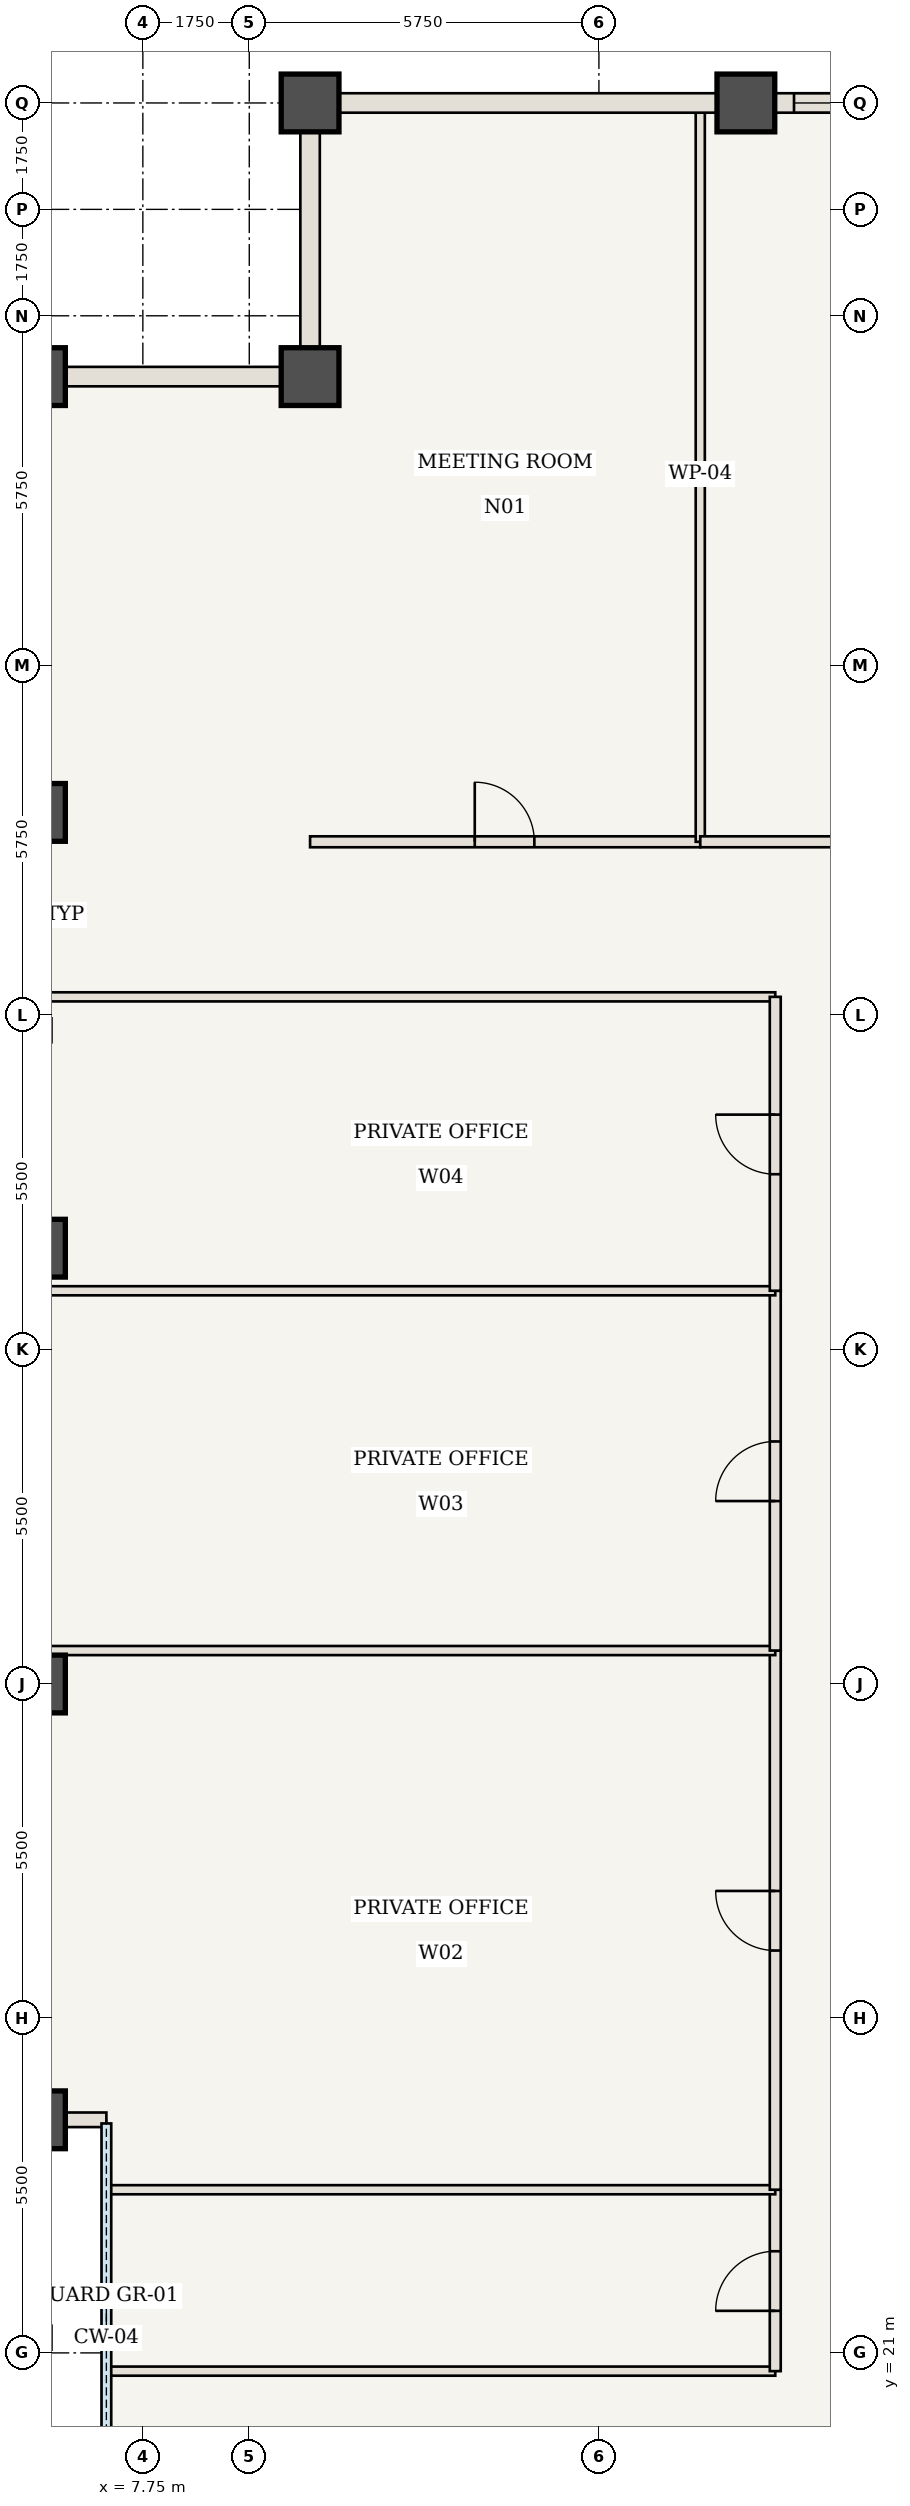
"""IFC4 building model, lengths in metres.
Left out: names, types, materials, properties, quantities, classifications, styles, units other than length and angle.
Written with IfcOpenShell. Run it as: python <this file> out.ifc"""

import sys

from ifc_helpers import new_model, si_unit, direction, frame, frame_2d, origin, origin_2d, place, context, subcontext, project, spatial, rectangle, extrude, element, fill, save


model = new_model("IFC4")
c1 = context("Model", 3, precision=1e-05, world=origin(), true_north=direction((0.0, 1.0)))
c2 = subcontext(c1, "Body", "Model", "MODEL_VIEW")
j1 = project(units=[si_unit("LENGTHUNIT", "METRE"), si_unit("PLANEANGLEUNIT", "RADIAN")], contexts=[c1])
p1 = place(None, origin())
s1 = spatial("IfcSite", under=j1, at=p1, CompositionType="ELEMENT")
p2 = place(p1, origin())
s2 = spatial("IfcBuilding", under=s1, at=p2, CompositionType="ELEMENT")
p3 = place(p2, frame((0.0, 0.0, 172.2)))
s3 = spatial("IfcBuildingStorey", under=s2, at=p3, CompositionType="ELEMENT", Elevation=172.2)
for number, where, z_axis, x_axis in (
    (1, (10.5, 58.0, 0.0), (0.0, 0.0, 1.0), (1.0, 0.0, 0.0)),
    (2, (10.5, 53.5, 0.0), (0.0, 0.0, 1.0), (1.0, 0.0, 0.0)),
    (3, (6.0, 53.5, 0.0), (0.0, 0.0, 1.0), (1.0, 0.0, 0.0)),
    (4, (17.667, 58.0, 0.0), (0.0, 0.0, 1.0), (1.0, 0.0, 0.0)),
    (5, (6.0, 24.833, 0.0), (0.0, 0.0, 1.0), (1.0, 0.0, 0.0)),
    (6, (6.0, 32.0, 0.0), (0.0, 0.0, 1.0), (1.0, 0.0, 0.0)),
    (7, (6.0, 39.167, 0.0), (0.0, 0.0, 1.0), (1.0, 0.0, 0.0)),
    (8, (6.0, 46.333, 0.0), (0.0, 0.0, 1.0), (1.0, 0.0, 0.0)),
):
    element("IfcColumn", number, at=place(p3, frame(where, z_axis=z_axis, x_axis=x_axis)), inside=s3, PredefinedType="COLUMN", context=c2, shape_type="SweptSolid", body=[
        extrude(rectangle(XDim=0.95, YDim=0.95, at=origin_2d()), origin(), (0.0, 0.0, 1.0), 3.85),
    ])
p4 = place(p3, frame((10.5, 45.85, 0.0), z_axis=(0.0, 0.0, 1.0), x_axis=(1.0, 0.0, 0.0)))
e9 = element("IfcWall", 9, at=p4, inside=s3, PredefinedType="STANDARD", context=c2, shape_type="SweptSolid", body=[
    extrude(rectangle(XDim=6.417, YDim=0.18, at=frame_2d((3.208, 0.0))), origin(), (0.0, 0.0, 1.0), 3.43),
])
p5 = place(p4, frame((2.708, 0.0, 0.0)))
e10 = element("IfcOpeningElement", 10, at=p5, cuts=e9, PredefinedType="OPENING", context=c2, shape_type="SweptSolid", body=[
    extrude(rectangle(XDim=0.98, YDim=2.2, at=frame_2d((0.49, 1.1))), frame((0.0, 0.1, 0.0), z_axis=(0.0, -1.0, 0.0), x_axis=(1.0, 0.0, 0.0)), (0.0, 0.0, 1.0), 0.2),
])
p6 = place(p3, frame((16.917, 45.85, 0.0), z_axis=(0.0, 0.0, 1.0), x_axis=(0.0, 1.0, 0.0)))
e11 = element("IfcWall", 11, at=p6, inside=s3, PredefinedType="STANDARD", context=c2, shape_type="SweptSolid", body=[
    extrude(rectangle(XDim=12.09, YDim=0.15, at=frame_2d((6.045, 0.0))), origin(), (0.0, 0.0, 1.0), 3.43),
])
p7 = place(p3, frame((16.917, 45.85, 0.0), z_axis=(0.0, 0.0, 1.0), x_axis=(1.0, 0.0, 0.0)))
e12 = element("IfcWall", 12, at=p7, inside=s3, PredefinedType="STANDARD", context=c2, shape_type="SweptSolid", body=[
    extrude(rectangle(XDim=8.866, YDim=0.18, at=frame_2d((4.433, 0.0))), origin(), (0.0, 0.0, 1.0), 3.43),
])
p8 = place(p7, frame((5.383, 0.0, 0.0)))
e13 = element("IfcOpeningElement", 13, at=p8, cuts=e12, PredefinedType="OPENING", context=c2, shape_type="SweptSolid", body=[
    extrude(rectangle(XDim=0.98, YDim=2.2, at=frame_2d((0.49, 1.1))), frame((0.0, 0.1, 0.0), z_axis=(0.0, -1.0, 0.0), x_axis=(1.0, 0.0, 0.0)), (0.0, 0.0, 1.0), 0.2),
])
p9 = place(p3, frame((7.16, 20.7, 0.0), z_axis=(0.0, 0.0, 1.0), x_axis=(1.0, 0.0, 0.0)))
e14 = element("IfcWall", 14, at=p9, inside=s3, PredefinedType="STANDARD", context=c2, shape_type="SweptSolid", body=[
    extrude(rectangle(XDim=10.99, YDim=0.15, at=frame_2d((5.495, 0.0))), origin(), (0.0, 0.0, 1.0), 2.81),
])
p10 = place(p3, frame((6.06, 43.3, 0.0), z_axis=(0.0, 0.0, 1.0), x_axis=(1.0, 0.0, 0.0)))
e15 = element("IfcWall", 15, at=p10, inside=s3, PredefinedType="STANDARD", context=c2, shape_type="SweptSolid", body=[
    extrude(rectangle(XDim=12.09, YDim=0.15, at=frame_2d((6.045, 0.0))), origin(), (0.0, 0.0, 1.0), 2.81),
])
p11 = place(p3, frame((18.15, 20.7, 0.0), z_axis=(0.0, 0.0, 1.0), x_axis=(0.0, 1.0, 0.0)))
e16 = element("IfcWall", 16, at=p11, inside=s3, PredefinedType="STANDARD", context=c2, shape_type="SweptSolid", body=[
    extrude(rectangle(XDim=2.983, YDim=0.18, at=frame_2d((1.492, 0.0))), origin(), (0.0, 0.0, 1.0), 3.43),
])
p12 = place(p11, frame((0.992, 0.0, 0.0)))
e17 = element("IfcOpeningElement", 17, at=p12, cuts=e16, PredefinedType="OPENING", context=c2, shape_type="SweptSolid", body=[
    extrude(rectangle(XDim=0.98, YDim=2.2, at=frame_2d((0.49, 1.1))), frame((0.0, 0.1, 0.0), z_axis=(0.0, -1.0, 0.0), x_axis=(1.0, 0.0, 0.0)), (0.0, 0.0, 1.0), 0.2),
])
p13 = place(p3, frame((7.16, 23.683, 0.0), z_axis=(0.0, 0.0, 1.0), x_axis=(1.0, 0.0, 0.0)))
e18 = element("IfcWall", 18, at=p13, inside=s3, PredefinedType="STANDARD", context=c2, shape_type="SweptSolid", body=[
    extrude(rectangle(XDim=10.99, YDim=0.15, at=frame_2d((5.495, 0.0))), origin(), (0.0, 0.0, 1.0), 3.43),
])
p14 = place(p3, frame((18.15, 23.683, 0.0), z_axis=(0.0, 0.0, 1.0), x_axis=(0.0, 1.0, 0.0)))
e19 = element("IfcWall", 19, at=p14, inside=s3, PredefinedType="STANDARD", context=c2, shape_type="SweptSolid", body=[
    extrude(rectangle(XDim=8.867, YDim=0.18, at=frame_2d((4.433, 0.0))), origin(), (0.0, 0.0, 1.0), 3.43),
])
p15 = place(p14, frame((3.933, 0.0, 0.0)))
e20 = element("IfcOpeningElement", 20, at=p15, cuts=e19, PredefinedType="OPENING", context=c2, shape_type="SweptSolid", body=[
    extrude(rectangle(XDim=0.98, YDim=2.2, at=frame_2d((0.49, 1.1))), frame((0.0, 0.1, 0.0), z_axis=(0.0, -1.0, 0.0), x_axis=(1.0, 0.0, 0.0)), (0.0, 0.0, 1.0), 0.2),
])
p16 = place(p3, frame((6.06, 32.55, 0.0), z_axis=(0.0, 0.0, 1.0), x_axis=(1.0, 0.0, 0.0)))
e21 = element("IfcWall", 21, at=p16, inside=s3, PredefinedType="STANDARD", context=c2, shape_type="SweptSolid", body=[
    extrude(rectangle(XDim=12.09, YDim=0.15, at=frame_2d((6.045, 0.0))), origin(), (0.0, 0.0, 1.0), 3.43),
])
p17 = place(p3, frame((18.15, 32.55, 0.0), z_axis=(0.0, 0.0, 1.0), x_axis=(0.0, 1.0, 0.0)))
e22 = element("IfcWall", 22, at=p17, inside=s3, PredefinedType="STANDARD", context=c2, shape_type="SweptSolid", body=[
    extrude(rectangle(XDim=5.917, YDim=0.18, at=frame_2d((2.958, 0.0))), origin(), (0.0, 0.0, 1.0), 3.43),
])
p18 = place(p17, frame((2.458, 0.0, 0.0)))
e23 = element("IfcOpeningElement", 23, at=p18, cuts=e22, PredefinedType="OPENING", context=c2, shape_type="SweptSolid", body=[
    extrude(rectangle(XDim=0.98, YDim=2.2, at=frame_2d((0.49, 1.1))), frame((0.0, 0.1, 0.0), z_axis=(0.0, -1.0, 0.0), x_axis=(1.0, 0.0, 0.0)), (0.0, 0.0, 1.0), 0.2),
])
p19 = place(p3, frame((6.06, 38.467, 0.0), z_axis=(0.0, 0.0, 1.0), x_axis=(1.0, 0.0, 0.0)))
e24 = element("IfcWall", 24, at=p19, inside=s3, PredefinedType="STANDARD", context=c2, shape_type="SweptSolid", body=[
    extrude(rectangle(XDim=12.09, YDim=0.15, at=frame_2d((6.045, 0.0))), origin(), (0.0, 0.0, 1.0), 3.43),
])
p20 = place(p3, frame((18.15, 38.467, 0.0), z_axis=(0.0, 0.0, 1.0), x_axis=(0.0, 1.0, 0.0)))
e25 = element("IfcWall", 25, at=p20, inside=s3, PredefinedType="STANDARD", context=c2, shape_type="SweptSolid", body=[
    extrude(rectangle(XDim=4.833, YDim=0.18, at=frame_2d((2.417, 0.0))), origin(), (0.0, 0.0, 1.0), 3.43),
])
p21 = place(p20, frame((1.917, 0.0, 0.0)))
e26 = element("IfcOpeningElement", 26, at=p21, cuts=e25, PredefinedType="OPENING", context=c2, shape_type="SweptSolid", body=[
    extrude(rectangle(XDim=0.98, YDim=2.2, at=frame_2d((0.49, 1.1))), frame((0.0, 0.1, 0.0), z_axis=(0.0, -1.0, 0.0), x_axis=(1.0, 0.0, 0.0)), (0.0, 0.0, 1.0), 0.2),
])
p22 = place(p3, frame((10.5, 58.0, 0.0), z_axis=(0.0, 0.0, 1.0), x_axis=(1.0, 0.0, 0.0)))
e27 = element("IfcWall", 27, at=p22, inside=s3, PredefinedType="USERDEFINED", context=c2, shape_type="SweptSolid", body=[
    extrude(rectangle(XDim=7.167, YDim=0.32, at=frame_2d((3.583, 0.0))), origin(), (0.0, 0.0, 1.0), 2.63),
])
p23 = place(p3, frame((17.667, 58.0, 0.0), z_axis=(0.0, 0.0, 1.0), x_axis=(1.0, 0.0, 0.0)))
e28 = element("IfcWall", 28, at=p23, inside=s3, PredefinedType="USERDEFINED", context=c2, shape_type="SweptSolid", body=[
    extrude(rectangle(XDim=7.167, YDim=0.32, at=frame_2d((3.583, 0.0))), origin(), (0.0, 0.0, 1.0), 2.63),
])
p24 = place(p23, frame((0.792, 0.0, 0.85)))
e29 = element("IfcOpeningElement", 29, at=p24, cuts=e28, PredefinedType="OPENING", context=c2, shape_type="SweptSolid", body=[
    extrude(rectangle(XDim=2.2, YDim=1.58, at=frame_2d((1.1, 0.79))), frame((0.0, 0.17, 0.0), z_axis=(0.0, -1.0, 0.0), x_axis=(1.0, 0.0, 0.0)), (0.0, 0.0, 1.0), 0.34),
])
p25 = place(p23, frame((4.175, 0.0, 0.85)))
e30 = element("IfcOpeningElement", 30, at=p25, cuts=e28, PredefinedType="OPENING", context=c2, shape_type="SweptSolid", body=[
    extrude(rectangle(XDim=2.2, YDim=1.58, at=frame_2d((1.1, 0.79))), frame((0.0, 0.17, 0.0), z_axis=(0.0, -1.0, 0.0), x_axis=(1.0, 0.0, 0.0)), (0.0, 0.0, 1.0), 0.34),
])
p26 = place(p3, frame((6.0, 24.833, 0.0), z_axis=(0.0, 0.0, 1.0), x_axis=(1.0, 0.0, 0.0)))
e31 = element("IfcWall", 31, at=p26, inside=s3, PredefinedType="USERDEFINED", context=c2, shape_type="SweptSolid", body=[
    extrude(rectangle(XDim=1.15, YDim=0.24, at=frame_2d((0.575, 0.0))), origin(), (0.0, 0.0, 1.0), 2.63),
])
for number, where, z_axis, x_axis in (
    (32, (10.5, 53.5, 0.0), (0.0, 0.0, 1.0), (0.0, 1.0, 0.0)),
    (33, (6.0, 53.5, 0.0), (0.0, 0.0, 1.0), (1.0, 0.0, 0.0)),
):
    element("IfcWall", number, at=place(p3, frame(where, z_axis=z_axis, x_axis=x_axis)), inside=s3, PredefinedType="USERDEFINED", context=c2, shape_type="SweptSolid", body=[
        extrude(rectangle(XDim=4.5, YDim=0.32, at=frame_2d((2.25, 0.0))), origin(), (0.0, 0.0, 1.0), 2.63),
    ])
p27 = place(p5, origin())
e34 = element("IfcDoor", 34, at=p27, inside=s3, OperationType="SINGLE_SWING_LEFT", PredefinedType="DOOR", context=c2, shape_type="SweptSolid", body=[
    extrude(rectangle(XDim=0.98, YDim=2.2, at=frame_2d((0.49, 1.1))), frame((0.0, 0.025, 0.0), z_axis=(0.0, -1.0, 0.0), x_axis=(1.0, 0.0, 0.0)), (0.0, 0.0, 1.0), 0.05),
])
fill(e10, e34)
p28 = place(p12, origin())
e35 = element("IfcDoor", 35, at=p28, inside=s3, OperationType="SINGLE_SWING_LEFT", PredefinedType="DOOR", context=c2, shape_type="SweptSolid", body=[
    extrude(rectangle(XDim=0.98, YDim=2.2, at=frame_2d((0.49, 1.1))), frame((0.0, 0.025, 0.0), z_axis=(0.0, -1.0, 0.0), x_axis=(1.0, 0.0, 0.0)), (0.0, 0.0, 1.0), 0.05),
])
fill(e17, e35)
p29 = place(p15, origin())
e36 = element("IfcDoor", 36, at=p29, inside=s3, OperationType="SINGLE_SWING_RIGHT", PredefinedType="DOOR", context=c2, shape_type="SweptSolid", body=[
    extrude(rectangle(XDim=0.98, YDim=2.2, at=frame_2d((0.49, 1.1))), frame((0.0, 0.025, 0.0), z_axis=(0.0, -1.0, 0.0), x_axis=(1.0, 0.0, 0.0)), (0.0, 0.0, 1.0), 0.05),
])
fill(e20, e36)
p30 = place(p18, origin())
e37 = element("IfcDoor", 37, at=p30, inside=s3, OperationType="SINGLE_SWING_LEFT", PredefinedType="DOOR", context=c2, shape_type="SweptSolid", body=[
    extrude(rectangle(XDim=0.98, YDim=2.2, at=frame_2d((0.49, 1.1))), frame((0.0, 0.025, 0.0), z_axis=(0.0, -1.0, 0.0), x_axis=(1.0, 0.0, 0.0)), (0.0, 0.0, 1.0), 0.05),
])
fill(e23, e37)
p31 = place(p21, origin())
e38 = element("IfcDoor", 38, at=p31, inside=s3, OperationType="SINGLE_SWING_RIGHT", PredefinedType="DOOR", context=c2, shape_type="SweptSolid", body=[
    extrude(rectangle(XDim=0.98, YDim=2.2, at=frame_2d((0.49, 1.1))), frame((0.0, 0.025, 0.0), z_axis=(0.0, -1.0, 0.0), x_axis=(1.0, 0.0, 0.0)), (0.0, 0.0, 1.0), 0.05),
])
fill(e26, e38)
p32 = place(p24, origin())
e39 = element("IfcWindow", 39, at=p32, inside=s3, PartitioningType="SINGLE_PANEL", PredefinedType="WINDOW", context=c2, shape_type="SweptSolid", body=[
    extrude(rectangle(XDim=2.2, YDim=1.58, at=frame_2d((1.1, 0.79))), frame((0.0, 0.03, 0.0), z_axis=(0.0, -1.0, 0.0), x_axis=(1.0, 0.0, 0.0)), (0.0, 0.0, 1.0), 0.06),
])
fill(e29, e39)
save(model, sys.argv[1])
